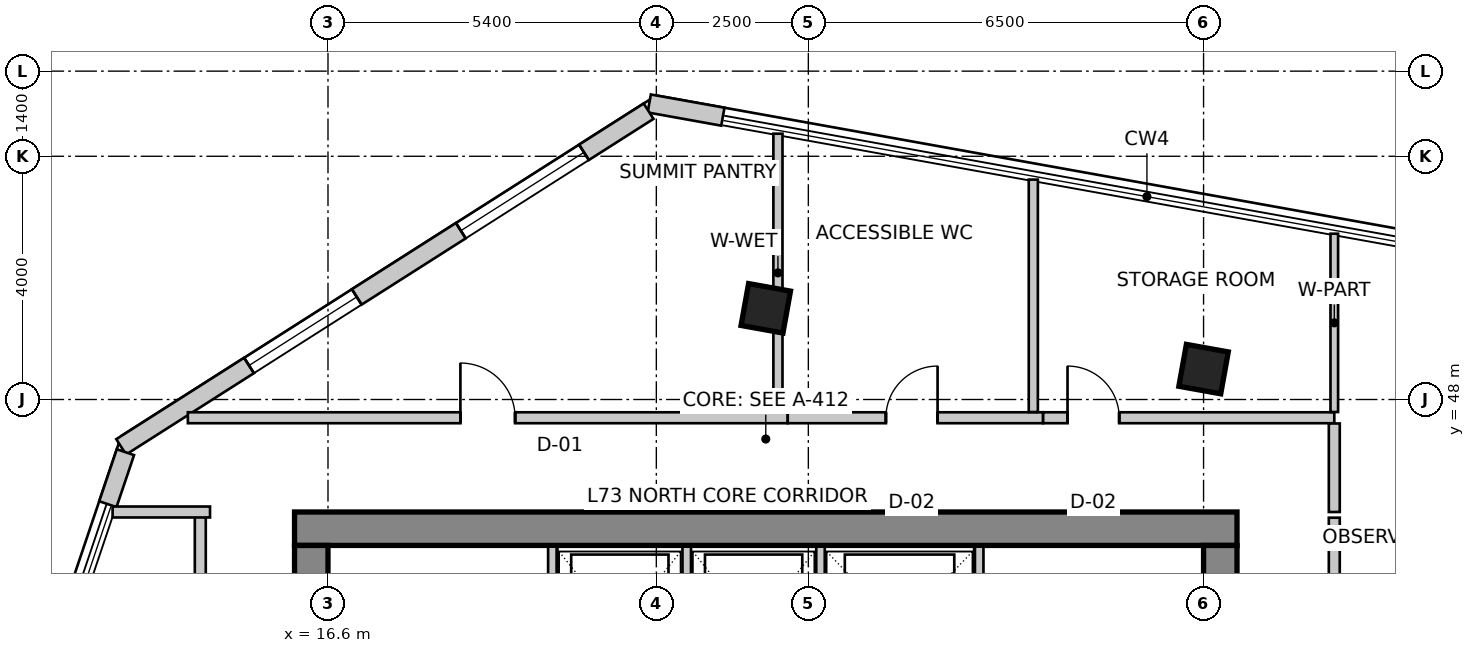
"""IFC4 building model, lengths in metres.
Left out: names, types, materials, properties, quantities, classifications, styles, units other than length and angle.
Written with IfcOpenShell. Run it as: python <this file> out.ifc"""

import sys

from ifc_helpers import new_model, si_unit, direction, frame, frame_2d, origin, origin_2d, place, context, subcontext, project, spatial, rectangle, extrude, source, transform, mapped, element, fill, save


model = new_model("IFC4")
c1 = context("Model", 3, precision=1e-05, world=origin(), true_north=direction((0.0, 1.0)))
c2 = subcontext(c1, "Body", "Model", "MODEL_VIEW")
j1 = project(units=[si_unit("LENGTHUNIT", "METRE"), si_unit("PLANEANGLEUNIT", "RADIAN")], contexts=[c1])
p1 = place(None, origin())
s1 = spatial("IfcSite", under=j1, at=p1, CompositionType="ELEMENT")
p2 = place(p1, origin())
s2 = spatial("IfcBuilding", under=s1, at=p2, CompositionType="ELEMENT")
p3 = place(p2, frame((0.0, 0.0, 285.3)))
s3 = spatial("IfcBuildingStorey", under=s2, at=p3, CompositionType="ELEMENT", Elevation=285.3)
p4 = place(p3, frame((16.05, 45.875, 0.0), z_axis=(0.0, 0.0, 1.0), x_axis=(1.0, 0.0, 0.0)))
e1 = element("IfcWall", 1, at=p4, inside=s3, PredefinedType="SHEAR", context=c2, shape_type="SweptSolid", body=[
    extrude(rectangle(XDim=15.5, YDim=0.55, at=frame_2d((7.75, 0.0))), origin(), (0.0, 0.0, 1.0), 3.6),
])
p5 = place(p3, frame((16.325, 34.2, 0.0), z_axis=(0.0, 0.0, 1.0), x_axis=(0.0, 1.0, 0.0)))
e2 = element("IfcWall", 2, at=p5, inside=s3, PredefinedType="SHEAR", context=c2, shape_type="SweptSolid", body=[
    extrude(rectangle(XDim=11.4, YDim=0.55, at=frame_2d((5.7, 0.0))), origin(), (0.0, 0.0, 1.0), 3.6),
])
m1 = source(origin(), c2, "Body", "SweptSolid", [
    extrude(rectangle(XDim=1.1, YDim=2.15, at=frame_2d((0.55, 1.075))), frame((0.0, 0.285, 0.0), z_axis=(0.0, -1.0, 0.0), x_axis=(1.0, 0.0, 0.0)), (0.0, 0.0, 1.0), 0.57),
])
p6 = place(p5, frame((7.15, 0.0, 0.0)))
e3 = element("IfcOpeningElement", 3, at=p6, cuts=e2, PredefinedType="OPENING", context=c2, shape_type="MappedRepresentation", body=[
    mapped(m1, transform((0.0, 0.0, 0.0), scale=1.0)),
])
p7 = place(p3, frame((31.275, 34.2, 0.0), z_axis=(0.0, 0.0, 1.0), x_axis=(0.0, 1.0, 0.0)))
e4 = element("IfcWall", 4, at=p7, inside=s3, PredefinedType="SHEAR", context=c2, shape_type="SweptSolid", body=[
    extrude(rectangle(XDim=11.4, YDim=0.55, at=frame_2d((5.7, 0.0))), origin(), (0.0, 0.0, 1.0), 3.6),
])
p8 = place(p7, frame((7.35, 0.0, 0.0)))
e5 = element("IfcOpeningElement", 5, at=p8, cuts=e4, PredefinedType="OPENING", context=c2, shape_type="MappedRepresentation", body=[
    mapped(m1, transform((0.0, 0.0, 0.0), scale=1.0)),
])
m2 = source(origin(), c2, "Body", "SweptSolid", [
    extrude(rectangle(XDim=0.7, YDim=0.7, at=origin_2d()), origin(), (0.0, 0.0, 1.0), 3.6),
])
for number, where, z_axis, x_axis in (
    (6, (23.8, 49.5, 0.0), (0.0, 0.0, 1.0), (0.984, -0.177, 0.0)),
    (7, (31.0, 48.5, 0.0), (0.0, 0.0, 1.0), (0.984, -0.177, 0.0)),
):
    element("IfcColumn", number, at=place(p3, frame(where, z_axis=z_axis, x_axis=x_axis)), inside=s3, PredefinedType="COLUMN", context=c2, shape_type="MappedRepresentation", body=[
        mapped(m2, transform((0.0, 0.0, 0.0), scale=1.0)),
    ])
p9 = place(p3, frame((23.094, 52.651, 0.0), z_axis=(0.0, 0.0, 1.0), x_axis=(-0.984233125072, 0.176876102146, 0.0)))
e8 = element("IfcWall", 8, at=p9, inside=s3, PredefinedType="SOLIDWALL", context=c2, shape_type="SweptSolid", body=[
    extrude(rectangle(XDim=1.23, YDim=0.3, at=frame_2d((0.615, 0.0))), origin(), (0.0, 0.0, 1.0), 3.35),
])
p10 = place(p3, frame((21.873, 52.741, 0.0), z_axis=(0.0, 0.0, 1.0), x_axis=(-0.843661487732, -0.536875492193, 0.0)))
e9 = element("IfcWall", 9, at=p10, inside=s3, PredefinedType="SOLIDWALL", context=c2, shape_type="SweptSolid", body=[
    extrude(rectangle(XDim=10.282, YDim=0.3, at=frame_2d((5.141, 0.0))), origin(), (0.0, 0.0, 1.0), 3.35),
])
m3 = source(origin(), c2, "Body", "SweptSolid", [
    extrude(rectangle(XDim=2.4, YDim=2.2, at=frame_2d((1.2, 1.1))), frame((0.0, 0.16, 0.0), z_axis=(0.0, -1.0, 0.0), x_axis=(1.0, 0.0, 0.0)), (0.0, 0.0, 1.0), 0.32),
])
p11 = place(p10, frame((1.26, 0.0, 0.85)))
e10 = element("IfcOpeningElement", 10, at=p11, cuts=e9, PredefinedType="OPENING", context=c2, shape_type="MappedRepresentation", body=[
    mapped(m3, transform((0.0, 0.0, 0.0), scale=1.0)),
])
m4 = source(origin(), c2, "Body", "SweptSolid", [
    extrude(rectangle(XDim=2.1, YDim=2.0, at=frame_2d((1.05, 1.0))), frame((0.0, 0.16, 0.0), z_axis=(0.0, -1.0, 0.0), x_axis=(1.0, 0.0, 0.0)), (0.0, 0.0, 1.0), 0.32),
])
p12 = place(p10, frame((5.689, 0.0, 0.85)))
e11 = element("IfcOpeningElement", 11, at=p12, cuts=e9, PredefinedType="OPENING", context=c2, shape_type="MappedRepresentation", body=[
    mapped(m4, transform((0.0, 0.0, 0.0), scale=1.0)),
])
p13 = place(p3, frame((13.269, 47.134, 0.0), z_axis=(0.0, 0.0, 1.0), x_axis=(-0.31995770778, -0.947431826166, 0.0)))
e12 = element("IfcWall", 12, at=p13, inside=s3, PredefinedType="SOLIDWALL", context=c2, shape_type="SweptSolid", body=[
    extrude(rectangle(XDim=0.903, YDim=0.3, at=frame_2d((0.451, 0.0))), origin(), (0.0, 0.0, 1.0), 3.35),
])
for number, where, z_axis, x_axis in (
    (13, (20.29, 43.28, 0.0), (0.0, 0.0, 1.0), (0.0, 1.0, 0.0)),
    (14, (27.31, 43.28, 0.0), (0.0, 0.0, 1.0), (0.0, 1.0, 0.0)),
):
    element("IfcWall", number, at=place(p3, frame(where, z_axis=z_axis, x_axis=x_axis)), inside=s3, PredefinedType="SOLIDWALL", context=c2, shape_type="SweptSolid", body=[
        extrude(rectangle(XDim=2.3, YDim=0.14, at=frame_2d((1.15, 0.0))), origin(), (0.0, 0.0, 1.0), 3.35),
    ])
for number, where, z_axis, x_axis in (
    (15, (22.5, 43.02, 0.0), (0.0, 0.0, 1.0), (0.0, 1.0, 0.0)),
    (16, (24.7, 43.02, 0.0), (0.0, 0.0, 1.0), (0.0, 1.0, 0.0)),
):
    element("IfcWall", number, at=place(p3, frame(where, z_axis=z_axis, x_axis=x_axis)), inside=s3, PredefinedType="SOLIDWALL", context=c2, shape_type="SweptSolid", body=[
        extrude(rectangle(XDim=2.56, YDim=0.14, at=frame_2d((1.28, 0.0))), origin(), (0.0, 0.0, 1.0), 3.35),
    ])
p14 = place(p3, frame((14.5, 33.744, 0.0), z_axis=(0.0, 0.0, 1.0), x_axis=(0.0, 1.0, 0.0)))
e17 = element("IfcWall", 17, at=p14, inside=s3, PredefinedType="PARTITIONING", context=c2, shape_type="SweptSolid", body=[
    extrude(rectangle(XDim=12.406, YDim=0.18, at=frame_2d((6.203, 0.0))), origin(), (0.0, 0.0, 1.0), 3.35),
])
m5 = source(origin(), c2, "Body", "SweptSolid", [
    extrude(rectangle(XDim=0.9, YDim=2.15, at=frame_2d((0.45, 1.075))), frame((0.0, 0.1, 0.0), z_axis=(0.0, -1.0, 0.0), x_axis=(1.0, 0.0, 0.0)), (0.0, 0.0, 1.0), 0.2),
])
p15 = place(p14, frame((4.37, 0.0, 0.0)))
e18 = element("IfcOpeningElement", 18, at=p15, cuts=e17, PredefinedType="OPENING", context=c2, shape_type="MappedRepresentation", body=[
    mapped(m5, transform((0.0, 0.0, 0.0), scale=1.0)),
])
p16 = place(p3, frame((14.66, 46.15, 0.0), z_axis=(0.0, 0.0, 1.0), x_axis=(-1.0, 0.0, 0.0)))
e19 = element("IfcWall", 19, at=p16, inside=s3, PredefinedType="PARTITIONING", context=c2, shape_type="SweptSolid", body=[
    extrude(rectangle(XDim=1.602, YDim=0.18, at=frame_2d((0.801, 0.0))), origin(), (0.0, 0.0, 1.0), 3.35),
])
p17 = place(p3, frame((14.295, 47.7, 0.0), z_axis=(0.0, 0.0, 1.0), x_axis=(1.0, 0.0, 0.0)))
e20 = element("IfcWall", 20, at=p17, inside=s3, PredefinedType="PARTITIONING", context=c2, shape_type="SweptSolid", body=[
    extrude(rectangle(XDim=9.865, YDim=0.18, at=frame_2d((4.932, 0.0))), origin(), (0.0, 0.0, 1.0), 3.019),
])
p18 = place(p17, frame((4.482, 0.0, 0.0)))
e21 = element("IfcOpeningElement", 21, at=p18, cuts=e20, PredefinedType="OPENING", context=c2, shape_type="MappedRepresentation", body=[
    mapped(m5, transform((0.0, 0.0, 0.0), scale=1.0)),
])
p19 = place(p3, frame((24.162, 47.7, 0.0), z_axis=(0.0, 0.0, 1.0), x_axis=(1.0, 0.0, 0.0)))
e22 = element("IfcWall", 22, at=p19, inside=s3, PredefinedType="PARTITIONING", context=c2, shape_type="SweptSolid", body=[
    extrude(rectangle(XDim=4.198, YDim=0.18, at=frame_2d((2.099, 0.0))), origin(), (0.0, 0.0, 1.0), 3.35),
])
m6 = source(origin(), c2, "Body", "SweptSolid", [
    extrude(rectangle(XDim=0.85, YDim=2.15, at=frame_2d((0.425, 1.075))), frame((0.0, 0.1, 0.0), z_axis=(0.0, -1.0, 0.0), x_axis=(1.0, 0.0, 0.0)), (0.0, 0.0, 1.0), 0.2),
])
p20 = place(p19, frame((1.613, 0.0, 0.0)))
e23 = element("IfcOpeningElement", 23, at=p20, cuts=e22, PredefinedType="OPENING", context=c2, shape_type="MappedRepresentation", body=[
    mapped(m6, transform((0.0, 0.0, 0.0), scale=1.0)),
])
p21 = place(p3, frame((28.362, 47.7, 0.0), z_axis=(0.0, 0.0, 1.0), x_axis=(1.0, 0.0, 0.0)))
e24 = element("IfcWall", 24, at=p21, inside=s3, PredefinedType="PARTITIONING", context=c2, shape_type="SweptSolid", body=[
    extrude(rectangle(XDim=4.788, YDim=0.18, at=frame_2d((2.394, 0.0))), origin(), (0.0, 0.0, 1.0), 2.879),
])
p22 = place(p21, frame((0.401, 0.0, 0.0)))
e25 = element("IfcOpeningElement", 25, at=p22, cuts=e24, PredefinedType="OPENING", context=c2, shape_type="MappedRepresentation", body=[
    mapped(m6, transform((0.0, 0.0, 0.0), scale=1.0)),
])
p23 = place(p3, frame((33.15, 47.606, 0.0), z_axis=(0.0, 0.0, 1.0), x_axis=(0.0, -1.0, 0.0)))
e26 = element("IfcWall", 26, at=p23, inside=s3, PredefinedType="PARTITIONING", context=c2, shape_type="SweptSolid", body=[
    extrude(rectangle(XDim=1.456, YDim=0.18, at=frame_2d((0.728, 0.0))), origin(), (0.0, 0.0, 1.0), 3.35),
])
p24 = place(p3, frame((33.15, 46.056, 0.0), z_axis=(0.0, 0.0, 1.0), x_axis=(0.0, -1.0, 0.0)))
e27 = element("IfcWall", 27, at=p24, inside=s3, PredefinedType="PARTITIONING", context=c2, shape_type="SweptSolid", body=[
    extrude(rectangle(XDim=5.716, YDim=0.18, at=frame_2d((2.858, 0.0))), origin(), (0.0, 0.0, 1.0), 2.879),
])
m7 = source(origin(), c2, "Body", "SweptSolid", [
    extrude(rectangle(XDim=1.4, YDim=2.15, at=frame_2d((0.7, 1.075))), frame((0.0, 0.1, 0.0), z_axis=(0.0, -1.0, 0.0), x_axis=(1.0, 0.0, 0.0)), (0.0, 0.0, 1.0), 0.2),
])
p25 = place(p24, frame((2.219, 0.0, 0.0)))
e28 = element("IfcOpeningElement", 28, at=p25, cuts=e27, PredefinedType="OPENING", context=c2, shape_type="MappedRepresentation", body=[
    mapped(m7, transform((0.0, 0.0, 0.0), scale=1.0)),
])
p26 = place(p3, frame((24.0, 52.371, 0.0), z_axis=(0.0, 0.0, 1.0), x_axis=(0.0, -1.0, 0.0)))
e29 = element("IfcWall", 29, at=p26, inside=s3, PredefinedType="PARTITIONING", context=c2, shape_type="SweptSolid", body=[
    extrude(rectangle(XDim=4.577, YDim=0.15, at=frame_2d((2.289, 0.0))), origin(), (0.0, 0.0, 1.0), 2.642),
])
p27 = place(p3, frame((28.2, 51.616, 0.0), z_axis=(0.0, 0.0, 1.0), x_axis=(0.0, -1.0, 0.0)))
e30 = element("IfcWall", 30, at=p27, inside=s3, PredefinedType="PARTITIONING", context=c2, shape_type="SweptSolid", body=[
    extrude(rectangle(XDim=3.822, YDim=0.15, at=frame_2d((1.911, 0.0))), origin(), (0.0, 0.0, 1.0), 2.642),
])
p28 = place(p3, frame((33.15, 50.727, 0.0), z_axis=(0.0, 0.0, 1.0), x_axis=(0.0, -1.0, 0.0)))
e31 = element("IfcWall", 31, at=p28, inside=s3, PredefinedType="PARTITIONING", context=c2, shape_type="SweptSolid", body=[
    extrude(rectangle(XDim=2.933, YDim=0.125, at=frame_2d((1.466, 0.0))), origin(), (0.0, 0.0, 1.0), 2.642),
])
m8 = source(origin(), c2, "Body", "SweptSolid", [
    extrude(rectangle(XDim=2.4, YDim=2.2, at=frame_2d((1.2, 1.1))), frame((0.0, -0.015, 0.0), z_axis=(0.0, -1.0, 0.0), x_axis=(1.0, 0.0, 0.0)), (0.0, 0.0, 1.0), 0.06),
])
p29 = place(p11, origin())
e32 = element("IfcWindow", 32, at=p29, inside=s3, PartitioningType="SINGLE_PANEL", PredefinedType="WINDOW", context=c2, shape_type="MappedRepresentation", body=[
    mapped(m8, transform((0.0, 0.0, 0.0), scale=1.0)),
])
fill(e10, e32)
m9 = source(origin(), c2, "Body", "SweptSolid", [
    extrude(rectangle(XDim=2.1, YDim=2.0, at=frame_2d((1.05, 1.0))), frame((0.0, -0.015, 0.0), z_axis=(0.0, -1.0, 0.0), x_axis=(1.0, 0.0, 0.0)), (0.0, 0.0, 1.0), 0.06),
])
p30 = place(p12, origin())
e33 = element("IfcWindow", 33, at=p30, inside=s3, PartitioningType="SINGLE_PANEL", PredefinedType="WINDOW", context=c2, shape_type="MappedRepresentation", body=[
    mapped(m9, transform((0.0, 0.0, 0.0), scale=1.0)),
])
fill(e11, e33)
m10 = source(origin(), c2, "Body", "SweptSolid", [
    extrude(rectangle(XDim=0.9, YDim=2.15, at=frame_2d((0.45, 1.075))), frame((0.0, 0.025, 0.0), z_axis=(0.0, -1.0, 0.0), x_axis=(1.0, 0.0, 0.0)), (0.0, 0.0, 1.0), 0.05),
])
p31 = place(p18, origin())
e34 = element("IfcDoor", 34, at=p31, inside=s3, OperationType="SINGLE_SWING_LEFT", PredefinedType="DOOR", context=c2, shape_type="MappedRepresentation", body=[
    mapped(m10, transform((0.0, 0.0, 0.0), scale=1.0)),
])
fill(e21, e34)
m11 = source(origin(), c2, "Body", "SweptSolid", [
    extrude(rectangle(XDim=0.85, YDim=2.15, at=frame_2d((0.425, 1.075))), frame((0.0, 0.025, 0.0), z_axis=(0.0, -1.0, 0.0), x_axis=(1.0, 0.0, 0.0)), (0.0, 0.0, 1.0), 0.05),
])
p32 = place(p20, origin())
e35 = element("IfcDoor", 35, at=p32, inside=s3, OperationType="SINGLE_SWING_RIGHT", PredefinedType="DOOR", context=c2, shape_type="MappedRepresentation", body=[
    mapped(m11, transform((0.0, 0.0, 0.0), scale=1.0)),
])
fill(e23, e35)
p33 = place(p22, origin())
e36 = element("IfcDoor", 36, at=p33, inside=s3, OperationType="SINGLE_SWING_LEFT", PredefinedType="DOOR", context=c2, shape_type="MappedRepresentation", body=[
    mapped(m11, transform((0.0, 0.0, 0.0), scale=1.0)),
])
fill(e25, e36)
save(model, sys.argv[1])
